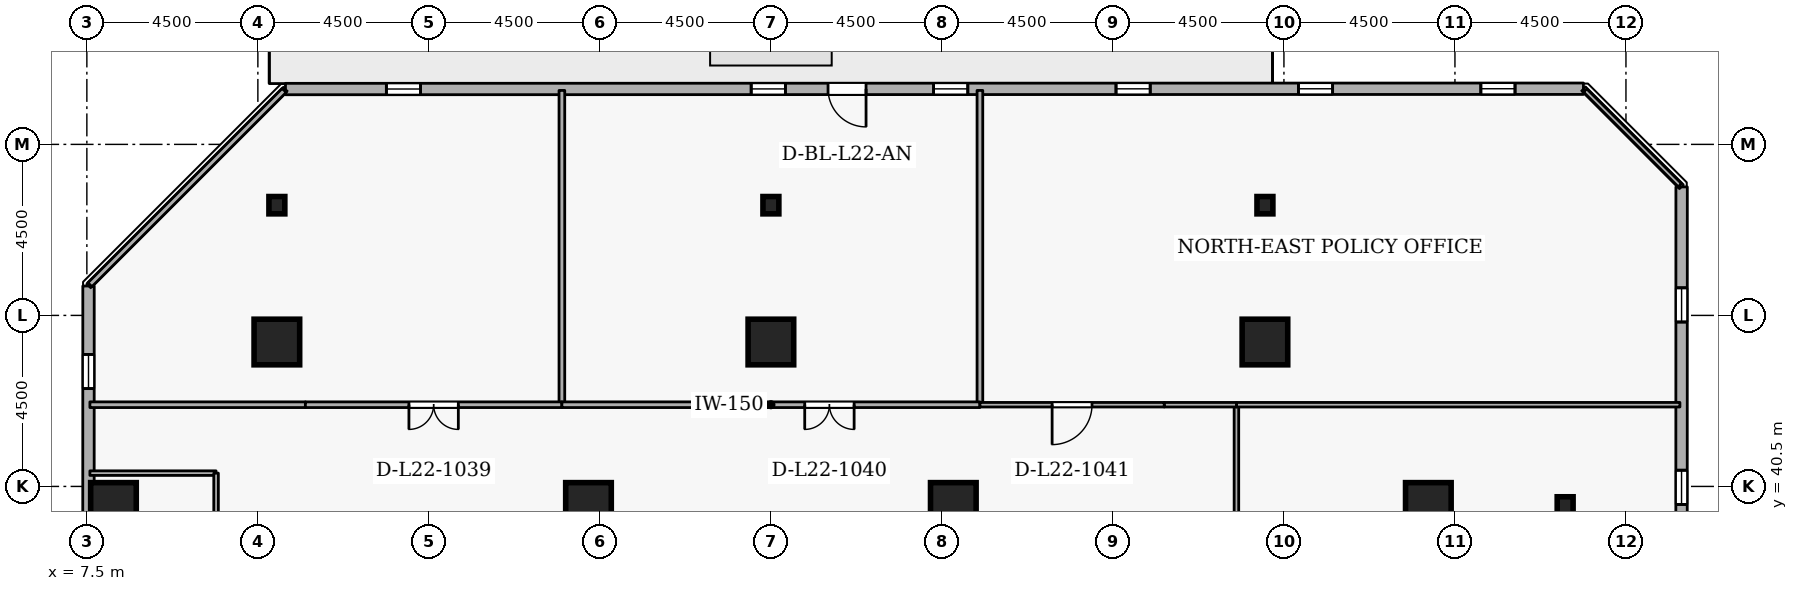
"""IFC4 building model, lengths in metres.
Left out: names, types, materials, properties, quantities, classifications, styles, units other than length and angle.
Written with IfcOpenShell. Run it as: python <this file> out.ifc"""

import sys

from ifc_helpers import new_model, si_unit, direction, frame, frame_2d, origin, origin_2d, place, context, subcontext, project, spatial, rectangle, i_section, extrude, element, fill, save


model = new_model("IFC4")
c1 = context("Model", 3, precision=1e-05, world=origin(), true_north=direction((0.0, 1.0)))
c2 = subcontext(c1, "Body", "Model", "MODEL_VIEW")
j1 = project(units=[si_unit("LENGTHUNIT", "METRE"), si_unit("PLANEANGLEUNIT", "RADIAN")], contexts=[c1])
p1 = place(None, origin())
s1 = spatial("IfcSite", under=j1, at=p1, CompositionType="ELEMENT")
p2 = place(p1, origin())
s2 = spatial("IfcBuilding", under=s1, at=p2, CompositionType="ELEMENT")
p3 = place(p2, frame((0.0, 0.0, 87.3)))
s3 = spatial("IfcBuildingStorey", under=s2, at=p3, CompositionType="ELEMENT", Elevation=87.3)
for number, where, z_axis, x_axis in (
    (1, (42.8, 40.0, 0.0), (0.0, 0.0, 1.0), (1.0, 0.0, 0.0)),
    (2, (12.5, 44.3, 0.0), (0.0, 0.0, 1.0), (1.0, 0.0, 0.0)),
    (3, (25.5, 44.3, 0.0), (0.0, 0.0, 1.0), (1.0, 0.0, 0.0)),
    (4, (38.5, 44.3, 0.0), (0.0, 0.0, 1.0), (1.0, 0.0, 0.0)),
    (5, (8.2, 40.0, 0.0), (0.0, 0.0, 1.0), (1.0, 0.0, 0.0)),
    (6, (20.7, 40.0, 0.0), (0.0, 0.0, 1.0), (1.0, 0.0, 0.0)),
    (7, (30.3, 40.0, 0.0), (0.0, 0.0, 1.0), (1.0, 0.0, 0.0)),
):
    element("IfcColumn", number, at=place(p3, frame(where, z_axis=z_axis, x_axis=x_axis)), inside=s3, PredefinedType="COLUMN", context=c2, shape_type="SweptSolid", body=[
        extrude(rectangle(XDim=1.2, YDim=1.2, at=origin_2d()), origin(), (0.0, 0.0, 1.0), 3.6),
    ])
for number, where, z_axis, x_axis in (
    (8, (46.4, 40.0, 0.0), (0.0, 0.0, 1.0), (1.0, 0.0, 0.0)),
    (9, (12.5, 47.9, 0.0), (0.0, 0.0, 1.0), (1.0, 0.0, 0.0)),
    (10, (25.5, 47.9, 0.0), (0.0, 0.0, 1.0), (1.0, 0.0, 0.0)),
    (11, (38.5, 47.9, 0.0), (0.0, 0.0, 1.0), (1.0, 0.0, 0.0)),
):
    element("IfcColumn", number, at=place(p3, frame(where, z_axis=z_axis, x_axis=x_axis)), inside=s3, PredefinedType="COLUMN", context=c2, shape_type="SweptSolid", body=[
        extrude(i_section(OverallWidth=0.418, OverallDepth=0.456, WebThickness=0.042, FlangeThickness=0.067, FilletRadius=0.015, at=origin_2d()), origin(), (0.0, 0.0, 1.0), 3.6),
    ])
p4 = place(p3, frame((49.456, 14.226, 0.0), z_axis=(0.0, 0.0, 1.0), x_axis=(0.000243032466, 0.999999970468, 0.0)))
e12 = element("IfcWall", 12, at=p4, inside=s3, PredefinedType="STANDARD", context=c2, shape_type="SweptSolid", body=[
    extrude(rectangle(XDim=34.155, YDim=0.3, at=frame_2d((17.078, 0.0))), origin(), (0.0, 0.0, 1.0), 2.7),
])
p5 = place(p4, frame((1.8, 0.0, 0.72)))
e13 = element("IfcOpeningElement", 13, at=p5, cuts=e12, PredefinedType="OPENING", context=c2, shape_type="SweptSolid", body=[
    extrude(rectangle(XDim=0.9, YDim=1.75, at=frame_2d((0.45, 0.875))), frame((0.0, 0.16, 0.0), z_axis=(0.0, -1.0, 0.0), x_axis=(1.0, 0.0, 0.0)), (0.0, 0.0, 1.0), 0.32),
])
p6 = place(p4, frame((6.6, 0.0, 0.72)))
e14 = element("IfcOpeningElement", 14, at=p6, cuts=e12, PredefinedType="OPENING", context=c2, shape_type="SweptSolid", body=[
    extrude(rectangle(XDim=0.9, YDim=1.75, at=frame_2d((0.45, 0.875))), frame((0.0, 0.16, 0.0), z_axis=(0.0, -1.0, 0.0), x_axis=(1.0, 0.0, 0.0)), (0.0, 0.0, 1.0), 0.32),
])
p7 = place(p4, frame((11.4, 0.0, 0.72)))
e15 = element("IfcOpeningElement", 15, at=p7, cuts=e12, PredefinedType="OPENING", context=c2, shape_type="SweptSolid", body=[
    extrude(rectangle(XDim=0.9, YDim=1.75, at=frame_2d((0.45, 0.875))), frame((0.0, 0.16, 0.0), z_axis=(0.0, -1.0, 0.0), x_axis=(1.0, 0.0, 0.0)), (0.0, 0.0, 1.0), 0.32),
])
p8 = place(p4, frame((16.2, 0.0, 0.72)))
e16 = element("IfcOpeningElement", 16, at=p8, cuts=e12, PredefinedType="OPENING", context=c2, shape_type="SweptSolid", body=[
    extrude(rectangle(XDim=0.9, YDim=1.75, at=frame_2d((0.45, 0.875))), frame((0.0, 0.16, 0.0), z_axis=(0.0, -1.0, 0.0), x_axis=(1.0, 0.0, 0.0)), (0.0, 0.0, 1.0), 0.32),
])
p9 = place(p4, frame((21.0, 0.0, 0.72)))
e17 = element("IfcOpeningElement", 17, at=p9, cuts=e12, PredefinedType="OPENING", context=c2, shape_type="SweptSolid", body=[
    extrude(rectangle(XDim=0.9, YDim=1.75, at=frame_2d((0.45, 0.875))), frame((0.0, 0.16, 0.0), z_axis=(0.0, -1.0, 0.0), x_axis=(1.0, 0.0, 0.0)), (0.0, 0.0, 1.0), 0.32),
])
p10 = place(p4, frame((25.8, 0.0, 0.72)))
e18 = element("IfcOpeningElement", 18, at=p10, cuts=e12, PredefinedType="OPENING", context=c2, shape_type="SweptSolid", body=[
    extrude(rectangle(XDim=0.9, YDim=1.75, at=frame_2d((0.45, 0.875))), frame((0.0, 0.16, 0.0), z_axis=(0.0, -1.0, 0.0), x_axis=(1.0, 0.0, 0.0)), (0.0, 0.0, 1.0), 0.32),
])
p11 = place(p4, frame((30.6, 0.0, 0.72)))
e19 = element("IfcOpeningElement", 19, at=p11, cuts=e12, PredefinedType="OPENING", context=c2, shape_type="SweptSolid", body=[
    extrude(rectangle(XDim=0.9, YDim=1.75, at=frame_2d((0.45, 0.875))), frame((0.0, 0.16, 0.0), z_axis=(0.0, -1.0, 0.0), x_axis=(1.0, 0.0, 0.0)), (0.0, 0.0, 1.0), 0.32),
])
p12 = place(p3, frame((46.881, 50.965, 0.0), z_axis=(0.0, 0.0, 1.0), x_axis=(-0.999999970468, -0.000243032466, 0.0)))
e20 = element("IfcWall", 20, at=p12, inside=s3, PredefinedType="STANDARD", context=c2, shape_type="SweptSolid", body=[
    extrude(rectangle(XDim=34.155, YDim=0.3, at=frame_2d((17.078, 0.0))), origin(), (0.0, 0.0, 1.0), 2.7),
])
p13 = place(p12, frame((18.878, 0.0, 0.0)))
e21 = element("IfcOpeningElement", 21, at=p13, cuts=e20, PredefinedType="OPENING", context=c2, shape_type="SweptSolid", body=[
    extrude(rectangle(XDim=1.0, YDim=2.08, at=frame_2d((0.5, 1.04))), frame((0.0, 0.16, 0.0), z_axis=(0.0, -1.0, 0.0), x_axis=(1.0, 0.0, 0.0)), (0.0, 0.0, 1.0), 0.32),
])
p14 = place(p12, frame((1.8, 0.0, 0.72)))
e22 = element("IfcOpeningElement", 22, at=p14, cuts=e20, PredefinedType="OPENING", context=c2, shape_type="SweptSolid", body=[
    extrude(rectangle(XDim=0.9, YDim=1.75, at=frame_2d((0.45, 0.875))), frame((0.0, 0.16, 0.0), z_axis=(0.0, -1.0, 0.0), x_axis=(1.0, 0.0, 0.0)), (0.0, 0.0, 1.0), 0.32),
])
p15 = place(p12, frame((6.6, 0.0, 0.72)))
e23 = element("IfcOpeningElement", 23, at=p15, cuts=e20, PredefinedType="OPENING", context=c2, shape_type="SweptSolid", body=[
    extrude(rectangle(XDim=0.9, YDim=1.75, at=frame_2d((0.45, 0.875))), frame((0.0, 0.16, 0.0), z_axis=(0.0, -1.0, 0.0), x_axis=(1.0, 0.0, 0.0)), (0.0, 0.0, 1.0), 0.32),
])
p16 = place(p12, frame((11.4, 0.0, 0.72)))
e24 = element("IfcOpeningElement", 24, at=p16, cuts=e20, PredefinedType="OPENING", context=c2, shape_type="SweptSolid", body=[
    extrude(rectangle(XDim=0.9, YDim=1.75, at=frame_2d((0.45, 0.875))), frame((0.0, 0.16, 0.0), z_axis=(0.0, -1.0, 0.0), x_axis=(1.0, 0.0, 0.0)), (0.0, 0.0, 1.0), 0.32),
])
p17 = place(p12, frame((16.2, 0.0, 0.72)))
e25 = element("IfcOpeningElement", 25, at=p17, cuts=e20, PredefinedType="OPENING", context=c2, shape_type="SweptSolid", body=[
    extrude(rectangle(XDim=0.9, YDim=1.75, at=frame_2d((0.45, 0.875))), frame((0.0, 0.16, 0.0), z_axis=(0.0, -1.0, 0.0), x_axis=(1.0, 0.0, 0.0)), (0.0, 0.0, 1.0), 0.32),
])
p18 = place(p12, frame((21.0, 0.0, 0.72)))
e26 = element("IfcOpeningElement", 26, at=p18, cuts=e20, PredefinedType="OPENING", context=c2, shape_type="SweptSolid", body=[
    extrude(rectangle(XDim=0.9, YDim=1.75, at=frame_2d((0.45, 0.875))), frame((0.0, 0.16, 0.0), z_axis=(0.0, -1.0, 0.0), x_axis=(1.0, 0.0, 0.0)), (0.0, 0.0, 1.0), 0.32),
])
p19 = place(p12, frame((30.6, 0.0, 0.72)))
e27 = element("IfcOpeningElement", 27, at=p19, cuts=e20, PredefinedType="OPENING", context=c2, shape_type="SweptSolid", body=[
    extrude(rectangle(XDim=0.9, YDim=1.75, at=frame_2d((0.45, 0.875))), frame((0.0, 0.16, 0.0), z_axis=(0.0, -1.0, 0.0), x_axis=(1.0, 0.0, 0.0)), (0.0, 0.0, 1.0), 0.32),
])
p20 = place(p3, frame((7.544, 45.774, 0.0), z_axis=(0.0, 0.0, 1.0), x_axis=(-0.000243032466, -0.999999970468, 0.0)))
e28 = element("IfcWall", 28, at=p20, inside=s3, PredefinedType="STANDARD", context=c2, shape_type="SweptSolid", body=[
    extrude(rectangle(XDim=34.155, YDim=0.3, at=frame_2d((17.078, 0.0))), origin(), (0.0, 0.0, 1.0), 2.7),
])
p21 = place(p20, frame((1.8, 0.0, 0.72)))
e29 = element("IfcOpeningElement", 29, at=p21, cuts=e28, PredefinedType="OPENING", context=c2, shape_type="SweptSolid", body=[
    extrude(rectangle(XDim=0.9, YDim=1.75, at=frame_2d((0.45, 0.875))), frame((0.0, 0.16, 0.0), z_axis=(0.0, -1.0, 0.0), x_axis=(1.0, 0.0, 0.0)), (0.0, 0.0, 1.0), 0.32),
])
p22 = place(p20, frame((11.4, 0.0, 0.72)))
e30 = element("IfcOpeningElement", 30, at=p22, cuts=e28, PredefinedType="OPENING", context=c2, shape_type="SweptSolid", body=[
    extrude(rectangle(XDim=0.9, YDim=1.75, at=frame_2d((0.45, 0.875))), frame((0.0, 0.16, 0.0), z_axis=(0.0, -1.0, 0.0), x_axis=(1.0, 0.0, 0.0)), (0.0, 0.0, 1.0), 0.32),
])
p23 = place(p20, frame((16.2, 0.0, 0.72)))
e31 = element("IfcOpeningElement", 31, at=p23, cuts=e28, PredefinedType="OPENING", context=c2, shape_type="SweptSolid", body=[
    extrude(rectangle(XDim=0.9, YDim=1.75, at=frame_2d((0.45, 0.875))), frame((0.0, 0.16, 0.0), z_axis=(0.0, -1.0, 0.0), x_axis=(1.0, 0.0, 0.0)), (0.0, 0.0, 1.0), 0.32),
])
p24 = place(p20, frame((21.0, 0.0, 0.72)))
e32 = element("IfcOpeningElement", 32, at=p24, cuts=e28, PredefinedType="OPENING", context=c2, shape_type="SweptSolid", body=[
    extrude(rectangle(XDim=0.9, YDim=1.75, at=frame_2d((0.45, 0.875))), frame((0.0, 0.16, 0.0), z_axis=(0.0, -1.0, 0.0), x_axis=(1.0, 0.0, 0.0)), (0.0, 0.0, 1.0), 0.32),
])
p25 = place(p20, frame((25.8, 0.0, 0.72)))
e33 = element("IfcOpeningElement", 33, at=p25, cuts=e28, PredefinedType="OPENING", context=c2, shape_type="SweptSolid", body=[
    extrude(rectangle(XDim=0.9, YDim=1.75, at=frame_2d((0.45, 0.875))), frame((0.0, 0.16, 0.0), z_axis=(0.0, -1.0, 0.0), x_axis=(1.0, 0.0, 0.0)), (0.0, 0.0, 1.0), 0.32),
])
p26 = place(p3, frame((7.58, 40.85, 0.0), z_axis=(0.0, 0.0, 1.0), x_axis=(1.0, 0.0, 0.0)))
e34 = element("IfcWall", 34, at=p26, inside=s3, PredefinedType="PARTITIONING", context=c2, shape_type="SweptSolid", body=[
    extrude(rectangle(XDim=3.32, YDim=0.12, at=frame_2d((1.66, 0.0))), origin(), (0.0, 0.0, 1.0), 3.34),
])
p27 = place(p3, frame((10.9, 40.85, 0.0), z_axis=(0.0, 0.0, 1.0), x_axis=(0.0, -1.0, 0.0)))
e35 = element("IfcWall", 35, at=p27, inside=s3, PredefinedType="PARTITIONING", context=c2, shape_type="SweptSolid", body=[
    extrude(rectangle(XDim=4.912, YDim=0.12, at=frame_2d((2.456, 0.0))), origin(), (0.0, 0.0, 1.0), 3.34),
])
p28 = place(p3, frame((37.75, 33.3, 0.0), z_axis=(0.0, 0.0, 1.0), x_axis=(0.0, 1.0, 0.0)))
e36 = element("IfcWall", 36, at=p28, inside=s3, PredefinedType="PARTITIONING", context=c2, shape_type="SweptSolid", body=[
    extrude(rectangle(XDim=9.35, YDim=0.12, at=frame_2d((4.675, 0.0))), origin(), (0.0, 0.0, 1.0), 3.34),
])
p29 = place(p28, frame((4.15, 0.0, 0.0)))
e37 = element("IfcOpeningElement", 37, at=p29, cuts=e36, PredefinedType="OPENING", context=c2, shape_type="SweptSolid", body=[
    extrude(rectangle(XDim=1.05, YDim=2.1, at=frame_2d((0.525, 1.05))), frame((0.0, 0.07, 0.0), z_axis=(0.0, -1.0, 0.0), x_axis=(1.0, 0.0, 0.0)), (0.0, 0.0, 1.0), 0.14),
])
p30 = place(p3, frame((37.75, 42.65, 0.0), z_axis=(0.0, 0.0, 1.0), x_axis=(1.0, 0.0, 0.0)))
e38 = element("IfcWall", 38, at=p30, inside=s3, PredefinedType="PARTITIONING", context=c2, shape_type="SweptSolid", body=[
    extrude(rectangle(XDim=11.67, YDim=0.12, at=frame_2d((5.835, 0.0))), origin(), (0.0, 0.0, 1.0), 3.34),
])
p31 = place(p3, frame((13.25, 42.65, 0.0), z_axis=(0.0, 0.0, 1.0), x_axis=(-1.0, 0.0, 0.0)))
e39 = element("IfcWall", 39, at=p31, inside=s3, PredefinedType="PARTITIONING", context=c2, shape_type="SweptSolid", body=[
    extrude(rectangle(XDim=5.67, YDim=0.15, at=frame_2d((2.835, 0.0))), origin(), (0.0, 0.0, 1.0), 3.34),
])
p32 = place(p3, frame((7.58, 45.807, 0.0), z_axis=(0.0, 0.0, 1.0), x_axis=(0.707106781187, 0.707106781187, 0.0)))
e40 = element("IfcWall", 40, at=p32, inside=s3, PredefinedType="PARTITIONING", context=c2, shape_type="SweptSolid", body=[
    extrude(rectangle(XDim=7.23, YDim=0.15, at=frame_2d((3.615, 0.0))), origin(), (0.0, 0.0, 1.0), 3.34),
])
p33 = place(p3, frame((20.0, 50.92, 0.0), z_axis=(0.0, 0.0, 1.0), x_axis=(0.0, -1.0, 0.0)))
e41 = element("IfcWall", 41, at=p33, inside=s3, PredefinedType="PARTITIONING", context=c2, shape_type="SweptSolid", body=[
    extrude(rectangle(XDim=8.27, YDim=0.15, at=frame_2d((4.135, 0.0))), origin(), (0.0, 0.0, 1.0), 3.34),
])
p34 = place(p3, frame((20.0, 42.65, 0.0), z_axis=(0.0, 0.0, 1.0), x_axis=(-1.0, 0.0, 0.0)))
e42 = element("IfcWall", 42, at=p34, inside=s3, PredefinedType="PARTITIONING", context=c2, shape_type="SweptSolid", body=[
    extrude(rectangle(XDim=6.75, YDim=0.15, at=frame_2d((3.375, 0.0))), origin(), (0.0, 0.0, 1.0), 3.34),
])
p35 = place(p34, frame((2.725, 0.0, 0.0)))
e43 = element("IfcOpeningElement", 43, at=p35, cuts=e42, PredefinedType="OPENING", context=c2, shape_type="SweptSolid", body=[
    extrude(rectangle(XDim=1.3, YDim=2.12, at=frame_2d((0.65, 1.06))), frame((0.0, 0.085, 0.0), z_axis=(0.0, -1.0, 0.0), x_axis=(1.0, 0.0, 0.0)), (0.0, 0.0, 1.0), 0.17),
])
p36 = place(p3, frame((31.0, 50.92, 0.0), z_axis=(0.0, 0.0, 1.0), x_axis=(0.0, -1.0, 0.0)))
e44 = element("IfcWall", 44, at=p36, inside=s3, PredefinedType="PARTITIONING", context=c2, shape_type="SweptSolid", body=[
    extrude(rectangle(XDim=8.27, YDim=0.15, at=frame_2d((4.135, 0.0))), origin(), (0.0, 0.0, 1.0), 3.34),
])
p37 = place(p3, frame((31.0, 42.65, 0.0), z_axis=(0.0, 0.0, 1.0), x_axis=(-1.0, 0.0, 0.0)))
e45 = element("IfcWall", 45, at=p37, inside=s3, PredefinedType="PARTITIONING", context=c2, shape_type="SweptSolid", body=[
    extrude(rectangle(XDim=11.0, YDim=0.15, at=frame_2d((5.5, 0.0))), origin(), (0.0, 0.0, 1.0), 3.34),
])
p38 = place(p37, frame((3.31, 0.0, 0.0)))
e46 = element("IfcOpeningElement", 46, at=p38, cuts=e45, PredefinedType="OPENING", context=c2, shape_type="SweptSolid", body=[
    extrude(rectangle(XDim=1.3, YDim=2.12, at=frame_2d((0.65, 1.06))), frame((0.0, 0.085, 0.0), z_axis=(0.0, -1.0, 0.0), x_axis=(1.0, 0.0, 0.0)), (0.0, 0.0, 1.0), 0.17),
])
p39 = place(p3, frame((37.75, 42.65, 0.0), z_axis=(0.0, 0.0, 1.0), x_axis=(-1.0, 0.0, 0.0)))
e47 = element("IfcWall", 47, at=p39, inside=s3, PredefinedType="PARTITIONING", context=c2, shape_type="SweptSolid", body=[
    extrude(rectangle(XDim=1.9, YDim=0.12, at=frame_2d((0.95, 0.0))), origin(), (0.0, 0.0, 1.0), 2.895),
])
p40 = place(p3, frame((35.85, 42.65, 0.0), z_axis=(0.0, 0.0, 1.0), x_axis=(-1.0, 0.0, 0.0)))
e48 = element("IfcWall", 48, at=p40, inside=s3, PredefinedType="PARTITIONING", context=c2, shape_type="SweptSolid", body=[
    extrude(rectangle(XDim=4.85, YDim=0.12, at=frame_2d((2.425, 0.0))), origin(), (0.0, 0.0, 1.0), 2.895),
])
p41 = place(p40, frame((1.9, 0.0, 0.0)))
e49 = element("IfcOpeningElement", 49, at=p41, cuts=e48, PredefinedType="OPENING", context=c2, shape_type="SweptSolid", body=[
    extrude(rectangle(XDim=1.05, YDim=2.1, at=frame_2d((0.525, 1.05))), frame((0.0, 0.07, 0.0), z_axis=(0.0, -1.0, 0.0), x_axis=(1.0, 0.0, 0.0)), (0.0, 0.0, 1.0), 0.14),
])
p42 = place(p3, frame((46.925, 50.92, 0.0), z_axis=(0.0, 0.0, 1.0), x_axis=(0.707106781187, -0.707106781187, 0.0)))
e50 = element("IfcWall", 50, at=p42, inside=s3, PredefinedType="PARTITIONING", context=c2, shape_type="SweptSolid", body=[
    extrude(rectangle(XDim=3.528, YDim=0.12, at=frame_2d((1.764, 0.0))), origin(), (0.0, 0.0, 1.0), 3.34),
])
p43 = place(p10, origin())
e51 = element("IfcWindow", 51, at=p43, inside=s3, PartitioningType="SINGLE_PANEL", PredefinedType="WINDOW", context=c2, shape_type="SweptSolid", body=[
    extrude(rectangle(XDim=0.9, YDim=1.75, at=frame_2d((0.45, 0.875))), frame((0.0, 0.03, 0.0), z_axis=(0.0, -1.0, 0.0), x_axis=(1.0, 0.0, 0.0)), (0.0, 0.0, 1.0), 0.06),
])
fill(e18, e51)
p44 = place(p11, origin())
e52 = element("IfcWindow", 52, at=p44, inside=s3, PartitioningType="SINGLE_PANEL", PredefinedType="WINDOW", context=c2, shape_type="SweptSolid", body=[
    extrude(rectangle(XDim=0.9, YDim=1.75, at=frame_2d((0.45, 0.875))), frame((0.0, 0.03, 0.0), z_axis=(0.0, -1.0, 0.0), x_axis=(1.0, 0.0, 0.0)), (0.0, 0.0, 1.0), 0.06),
])
fill(e19, e52)
p45 = place(p13, origin())
e53 = element("IfcDoor", 53, at=p45, inside=s3, OperationType="SINGLE_SWING_LEFT", PredefinedType="DOOR", context=c2, shape_type="SweptSolid", body=[
    extrude(rectangle(XDim=1.0, YDim=2.08, at=frame_2d((0.5, 1.04))), frame((0.0, 0.025, 0.0), z_axis=(0.0, -1.0, 0.0), x_axis=(1.0, 0.0, 0.0)), (0.0, 0.0, 1.0), 0.05),
])
fill(e21, e53)
p46 = place(p14, origin())
e54 = element("IfcWindow", 54, at=p46, inside=s3, PartitioningType="SINGLE_PANEL", PredefinedType="WINDOW", context=c2, shape_type="SweptSolid", body=[
    extrude(rectangle(XDim=0.9, YDim=1.75, at=frame_2d((0.45, 0.875))), frame((0.0, 0.03, 0.0), z_axis=(0.0, -1.0, 0.0), x_axis=(1.0, 0.0, 0.0)), (0.0, 0.0, 1.0), 0.06),
])
fill(e22, e54)
p47 = place(p15, origin())
e55 = element("IfcWindow", 55, at=p47, inside=s3, PartitioningType="SINGLE_PANEL", PredefinedType="WINDOW", context=c2, shape_type="SweptSolid", body=[
    extrude(rectangle(XDim=0.9, YDim=1.75, at=frame_2d((0.45, 0.875))), frame((0.0, 0.03, 0.0), z_axis=(0.0, -1.0, 0.0), x_axis=(1.0, 0.0, 0.0)), (0.0, 0.0, 1.0), 0.06),
])
fill(e23, e55)
p48 = place(p16, origin())
e56 = element("IfcWindow", 56, at=p48, inside=s3, PartitioningType="SINGLE_PANEL", PredefinedType="WINDOW", context=c2, shape_type="SweptSolid", body=[
    extrude(rectangle(XDim=0.9, YDim=1.75, at=frame_2d((0.45, 0.875))), frame((0.0, 0.03, 0.0), z_axis=(0.0, -1.0, 0.0), x_axis=(1.0, 0.0, 0.0)), (0.0, 0.0, 1.0), 0.06),
])
fill(e24, e56)
p49 = place(p17, origin())
e57 = element("IfcWindow", 57, at=p49, inside=s3, PartitioningType="SINGLE_PANEL", PredefinedType="WINDOW", context=c2, shape_type="SweptSolid", body=[
    extrude(rectangle(XDim=0.9, YDim=1.75, at=frame_2d((0.45, 0.875))), frame((0.0, 0.03, 0.0), z_axis=(0.0, -1.0, 0.0), x_axis=(1.0, 0.0, 0.0)), (0.0, 0.0, 1.0), 0.06),
])
fill(e25, e57)
p50 = place(p18, origin())
e58 = element("IfcWindow", 58, at=p50, inside=s3, PartitioningType="SINGLE_PANEL", PredefinedType="WINDOW", context=c2, shape_type="SweptSolid", body=[
    extrude(rectangle(XDim=0.9, YDim=1.75, at=frame_2d((0.45, 0.875))), frame((0.0, 0.03, 0.0), z_axis=(0.0, -1.0, 0.0), x_axis=(1.0, 0.0, 0.0)), (0.0, 0.0, 1.0), 0.06),
])
fill(e26, e58)
p51 = place(p19, origin())
e59 = element("IfcWindow", 59, at=p51, inside=s3, PartitioningType="SINGLE_PANEL", PredefinedType="WINDOW", context=c2, shape_type="SweptSolid", body=[
    extrude(rectangle(XDim=0.9, YDim=1.75, at=frame_2d((0.45, 0.875))), frame((0.0, 0.03, 0.0), z_axis=(0.0, -1.0, 0.0), x_axis=(1.0, 0.0, 0.0)), (0.0, 0.0, 1.0), 0.06),
])
fill(e27, e59)
p52 = place(p21, origin())
e60 = element("IfcWindow", 60, at=p52, inside=s3, PartitioningType="SINGLE_PANEL", PredefinedType="WINDOW", context=c2, shape_type="SweptSolid", body=[
    extrude(rectangle(XDim=0.9, YDim=1.75, at=frame_2d((0.45, 0.875))), frame((0.0, 0.03, 0.0), z_axis=(0.0, -1.0, 0.0), x_axis=(1.0, 0.0, 0.0)), (0.0, 0.0, 1.0), 0.06),
])
fill(e29, e60)
p53 = place(p35, origin())
e61 = element("IfcDoor", 61, at=p53, inside=s3, OperationType="DOUBLE_DOOR_SINGLE_SWING", PredefinedType="DOOR", context=c2, shape_type="SweptSolid", body=[
    extrude(rectangle(XDim=1.3, YDim=2.12, at=frame_2d((0.65, 1.06))), frame((0.0, 0.025, 0.0), z_axis=(0.0, -1.0, 0.0), x_axis=(1.0, 0.0, 0.0)), (0.0, 0.0, 1.0), 0.05),
])
fill(e43, e61)
p54 = place(p38, origin())
e62 = element("IfcDoor", 62, at=p54, inside=s3, OperationType="DOUBLE_DOOR_SINGLE_SWING", PredefinedType="DOOR", context=c2, shape_type="SweptSolid", body=[
    extrude(rectangle(XDim=1.3, YDim=2.12, at=frame_2d((0.65, 1.06))), frame((0.0, 0.025, 0.0), z_axis=(0.0, -1.0, 0.0), x_axis=(1.0, 0.0, 0.0)), (0.0, 0.0, 1.0), 0.05),
])
fill(e46, e62)
p55 = place(p41, origin())
e63 = element("IfcDoor", 63, at=p55, inside=s3, OperationType="SINGLE_SWING_RIGHT", PredefinedType="DOOR", context=c2, shape_type="SweptSolid", body=[
    extrude(rectangle(XDim=1.05, YDim=2.1, at=frame_2d((0.525, 1.05))), frame((0.0, 0.025, 0.0), z_axis=(0.0, -1.0, 0.0), x_axis=(1.0, 0.0, 0.0)), (0.0, 0.0, 1.0), 0.05),
])
fill(e49, e63)
save(model, sys.argv[1])
